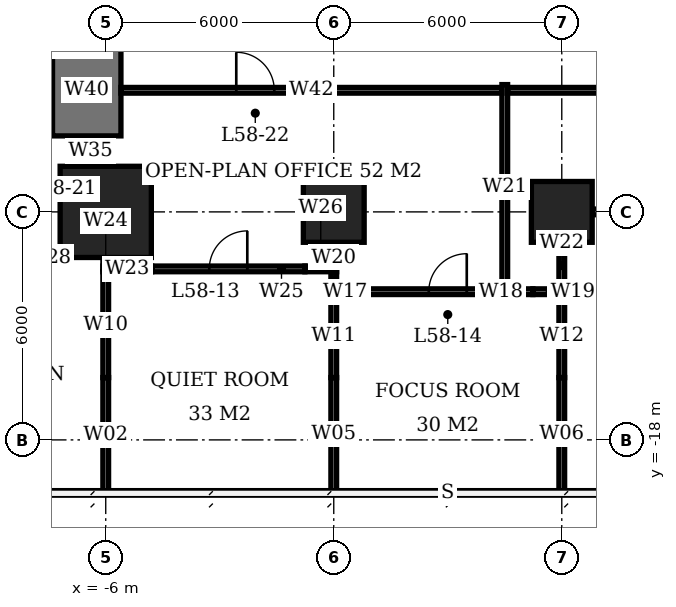
"""IFC4 building model, lengths in metres.
Left out: names, types, materials, properties, quantities, classifications, styles, units other than length and angle.
Written with IfcOpenShell. Run it as: python <this file> out.ifc"""

import sys

from ifc_helpers import new_model, si_unit, direction, frame, frame_2d, origin, origin_2d, place, context, subcontext, project, spatial, rectangle, extrude, element, fill, save


model = new_model("IFC4")
c1 = context("Model", 3, precision=1e-05, world=origin(), true_north=direction((0.0, 1.0)))
c2 = subcontext(c1, "Body", "Model", "MODEL_VIEW")
j1 = project(units=[si_unit("LENGTHUNIT", "METRE"), si_unit("PLANEANGLEUNIT", "RADIAN")], contexts=[c1])
p1 = place(None, origin())
s1 = spatial("IfcSite", under=j1, at=p1, CompositionType="ELEMENT")
p2 = place(p1, origin())
s2 = spatial("IfcBuilding", under=s1, at=p2, CompositionType="ELEMENT")
p3 = place(p2, frame((0.0, 0.0, 235.7)))
s3 = spatial("IfcBuildingStorey", under=s2, at=p3, CompositionType="ELEMENT", Elevation=235.7)
p4 = place(p3, frame((-6.0, -12.0, 0.0), z_axis=(0.0, 0.0, 1.0), x_axis=(1.0, 0.0, 0.0)))
e1 = element("IfcColumn", 1, at=p4, inside=s3, PredefinedType="COLUMN", context=c2, shape_type="SweptSolid", body=[
    extrude(rectangle(XDim=2.4, YDim=2.4, at=origin_2d()), origin(), (0.0, 0.0, 1.0), 3.9),
])
for number, where, z_axis, x_axis in (
    (2, (0.0, -12.0, 0.0), (0.0, 0.0, 1.0), (1.0, 0.0, 0.0)),
    (3, (6.0, -12.0, 0.0), (0.0, 0.0, 1.0), (1.0, 0.0, 0.0)),
):
    element("IfcColumn", number, at=place(p3, frame(where, z_axis=z_axis, x_axis=x_axis)), inside=s3, PredefinedType="COLUMN", context=c2, shape_type="SweptSolid", body=[
        extrude(rectangle(XDim=1.6, YDim=1.6, at=origin_2d()), origin(), (0.0, 0.0, 1.0), 3.9),
    ])
p5 = place(p3, frame((-6.5, -10.0, 0.0), z_axis=(0.0, 0.0, 1.0), x_axis=(0.0, 1.0, 0.0)))
e4 = element("IfcWall", 4, at=p5, inside=s3, PredefinedType="SHEAR", context=c2, shape_type="SweptSolid", body=[
    extrude(rectangle(XDim=2.4, YDim=1.8, at=frame_2d((1.2, 0.0))), origin(), (0.0, 0.0, 1.0), 3.9),
])
p6 = place(p3, frame((-0.15, -14.1, 0.0), z_axis=(0.0, 0.0, 1.0), x_axis=(1.0, 0.0, 0.0)))
e5 = element("IfcWall", 5, at=p6, inside=s3, PredefinedType="PARTITIONING", context=c2, shape_type="SweptSolid", body=[
    extrude(rectangle(XDim=0.91, YDim=0.15, at=frame_2d((0.455, 0.0))), origin(), (0.0, 0.0, 1.0), 2.15),
])
p7 = place(p3, frame((0.76, -14.1, 0.0), z_axis=(0.0, 0.0, 1.0), x_axis=(1.0, 0.0, 0.0)))
e6 = element("IfcWall", 6, at=p7, inside=s3, PredefinedType="PARTITIONING", context=c2, shape_type="SweptSolid", body=[
    extrude(rectangle(XDim=4.48, YDim=0.15, at=frame_2d((2.24, 0.0))), origin(), (0.0, 0.0, 1.0), 3.65),
])
p8 = place(p7, frame((1.74, 0.0, 0.0)))
e7 = element("IfcOpeningElement", 7, at=p8, cuts=e6, PredefinedType="OPENING", context=c2, shape_type="SweptSolid", body=[
    extrude(rectangle(XDim=1.0, YDim=2.1, at=frame_2d((0.5, 1.05))), frame((0.0, 0.085, 0.0), z_axis=(0.0, -1.0, 0.0), x_axis=(1.0, 0.0, 0.0)), (0.0, 0.0, 1.0), 0.17),
])
p9 = place(p3, frame((5.24, -14.1, 0.0), z_axis=(0.0, 0.0, 1.0), x_axis=(1.0, 0.0, 0.0)))
e8 = element("IfcWall", 8, at=p9, inside=s3, PredefinedType="PARTITIONING", context=c2, shape_type="SweptSolid", body=[
    extrude(rectangle(XDim=0.91, YDim=0.15, at=frame_2d((0.455, 0.0))), origin(), (0.0, 0.0, 1.0), 2.15),
])
p10 = place(p3, frame((-6.075, -13.5, 0.0), z_axis=(0.0, 0.0, 1.0), x_axis=(1.0, 0.0, 0.0)))
e9 = element("IfcWall", 9, at=p10, inside=s3, PredefinedType="PARTITIONING", context=c2, shape_type="SweptSolid", body=[
    extrude(rectangle(XDim=1.285, YDim=0.15, at=frame_2d((0.643, 0.0))), origin(), (0.0, 0.0, 1.0), 2.15),
])
p11 = place(p3, frame((-4.79, -13.5, 0.0), z_axis=(0.0, 0.0, 1.0), x_axis=(1.0, 0.0, 0.0)))
e10 = element("IfcWall", 10, at=p11, inside=s3, PredefinedType="PARTITIONING", context=c2, shape_type="SweptSolid", body=[
    extrude(rectangle(XDim=4.03, YDim=0.15, at=frame_2d((2.015, 0.0))), origin(), (0.0, 0.0, 1.0), 3.65),
])
p12 = place(p11, frame((1.515, 0.0, 0.0)))
e11 = element("IfcOpeningElement", 11, at=p12, cuts=e10, PredefinedType="OPENING", context=c2, shape_type="SweptSolid", body=[
    extrude(rectangle(XDim=1.0, YDim=2.1, at=frame_2d((0.5, 1.05))), frame((0.0, 0.085, 0.0), z_axis=(0.0, -1.0, 0.0), x_axis=(1.0, 0.0, 0.0)), (0.0, 0.0, 1.0), 0.17),
])
p13 = place(p3, frame((-0.76, -13.5, 0.0), z_axis=(0.0, 0.0, 1.0), x_axis=(1.0, 0.0, 0.0)))
e12 = element("IfcWall", 12, at=p13, inside=s3, PredefinedType="PARTITIONING", context=c2, shape_type="SweptSolid", body=[
    extrude(rectangle(XDim=0.835, YDim=0.15, at=frame_2d((0.417, 0.0))), origin(), (0.0, 0.0, 1.0), 2.15),
])
p14 = place(p3, frame((-8.992, -13.2, 0.0), z_axis=(0.0, 0.0, 1.0), x_axis=(1.0, 0.0, 0.0)))
e13 = element("IfcWall", 13, at=p14, inside=s3, PredefinedType="PARTITIONING", context=c2, shape_type="SweptSolid", body=[
    extrude(rectangle(XDim=1.792, YDim=0.15, at=frame_2d((0.896, 0.0))), origin(), (0.0, 0.0, 1.0), 2.15),
])
p15 = place(p3, frame((6.8, -12.0, 0.0), z_axis=(0.0, 0.0, 1.0), x_axis=(1.0, 0.0, 0.0)))
e14 = element("IfcWall", 14, at=p15, inside=s3, PredefinedType="PARTITIONING", context=c2, shape_type="SweptSolid", body=[
    extrude(rectangle(XDim=4.4, YDim=0.15, at=frame_2d((2.2, 0.0))), origin(), (0.0, 0.0, 1.0), 3.65),
])
p16 = place(p15, frame((1.7, 0.0, 0.0)))
e15 = element("IfcOpeningElement", 15, at=p16, cuts=e14, PredefinedType="OPENING", context=c2, shape_type="SweptSolid", body=[
    extrude(rectangle(XDim=1.0, YDim=2.1, at=frame_2d((0.5, 1.05))), frame((0.0, 0.085, 0.0), z_axis=(0.0, -1.0, 0.0), x_axis=(1.0, 0.0, 0.0)), (0.0, 0.0, 1.0), 0.17),
])
p17 = place(p3, frame((-6.0, -19.4, 0.0), z_axis=(0.0, 0.0, 1.0), x_axis=(0.0, 1.0, 0.0)))
e16 = element("IfcWall", 16, at=p17, inside=s3, PredefinedType="PARTITIONING", context=c2, shape_type="SweptSolid", body=[
    extrude(rectangle(XDim=3.04, YDim=0.15, at=frame_2d((1.52, 0.0))), origin(), (0.0, 0.0, 1.0), 3.65),
])
p18 = place(p3, frame((-6.0, -16.36, 0.0), z_axis=(0.0, 0.0, 1.0), x_axis=(0.0, 1.0, 0.0)))
e17 = element("IfcWall", 17, at=p18, inside=s3, PredefinedType="PARTITIONING", context=c2, shape_type="SweptSolid", body=[
    extrude(rectangle(XDim=2.785, YDim=0.15, at=frame_2d((1.393, 0.0))), origin(), (0.0, 0.0, 1.0), 2.15),
])
p19 = place(p3, frame((-6.0, -13.5, 0.0), z_axis=(0.0, 0.0, 1.0), x_axis=(0.0, 1.0, 0.0)))
e18 = element("IfcWall", 18, at=p19, inside=s3, PredefinedType="PARTITIONING", context=c2, shape_type="SweptSolid", body=[
    extrude(rectangle(XDim=0.3, YDim=0.15, at=frame_2d((0.15, 0.0))), origin(), (0.0, 0.0, 1.0), 2.15),
])
p20 = place(p3, frame((0.0, -19.35, 0.0), z_axis=(0.0, 0.0, 1.0), x_axis=(0.0, 1.0, 0.0)))
e19 = element("IfcWall", 19, at=p20, inside=s3, PredefinedType="PARTITIONING", context=c2, shape_type="SweptSolid", body=[
    extrude(rectangle(XDim=2.99, YDim=0.15, at=frame_2d((1.495, 0.0))), origin(), (0.0, 0.0, 1.0), 3.65),
])
p21 = place(p3, frame((0.0, -16.36, 0.0), z_axis=(0.0, 0.0, 1.0), x_axis=(0.0, 1.0, 0.0)))
e20 = element("IfcWall", 20, at=p21, inside=s3, PredefinedType="PARTITIONING", context=c2, shape_type="SweptSolid", body=[
    extrude(rectangle(XDim=2.185, YDim=0.15, at=frame_2d((1.093, 0.0))), origin(), (0.0, 0.0, 1.0), 2.15),
])
p22 = place(p3, frame((0.0, -14.025, 0.0), z_axis=(0.0, 0.0, 1.0), x_axis=(0.0, 1.0, 0.0)))
e21 = element("IfcWall", 21, at=p22, inside=s3, PredefinedType="PARTITIONING", context=c2, shape_type="SweptSolid", body=[
    extrude(rectangle(XDim=0.45, YDim=0.15, at=frame_2d((0.225, 0.0))), origin(), (0.0, 0.0, 1.0), 2.15),
])
p23 = place(p3, frame((6.0, -19.35, 0.0), z_axis=(0.0, 0.0, 1.0), x_axis=(0.0, 1.0, 0.0)))
e22 = element("IfcWall", 22, at=p23, inside=s3, PredefinedType="PARTITIONING", context=c2, shape_type="SweptSolid", body=[
    extrude(rectangle(XDim=2.99, YDim=0.15, at=frame_2d((1.495, 0.0))), origin(), (0.0, 0.0, 1.0), 3.65),
])
p24 = place(p3, frame((6.0, -16.36, 0.0), z_axis=(0.0, 0.0, 1.0), x_axis=(0.0, 1.0, 0.0)))
e23 = element("IfcWall", 23, at=p24, inside=s3, PredefinedType="PARTITIONING", context=c2, shape_type="SweptSolid", body=[
    extrude(rectangle(XDim=2.185, YDim=0.15, at=frame_2d((1.093, 0.0))), origin(), (0.0, 0.0, 1.0), 2.15),
])
p25 = place(p3, frame((6.0, -14.025, 0.0), z_axis=(0.0, 0.0, 1.0), x_axis=(0.0, 1.0, 0.0)))
e24 = element("IfcWall", 24, at=p25, inside=s3, PredefinedType="PARTITIONING", context=c2, shape_type="SweptSolid", body=[
    extrude(rectangle(XDim=1.225, YDim=0.15, at=frame_2d((0.612, 0.0))), origin(), (0.0, 0.0, 1.0), 2.15),
])
p26 = place(p3, frame((-6.4, -10.8, 0.0), z_axis=(0.0, 0.0, 1.0), x_axis=(0.0, 1.0, 0.0)))
e25 = element("IfcWall", 25, at=p26, inside=s3, PredefinedType="PARTITIONING", context=c2, shape_type="SweptSolid", body=[
    extrude(rectangle(XDim=0.8, YDim=0.15, at=frame_2d((0.4, 0.0))), origin(), (0.0, 0.0, 1.0), 3.65),
])
p27 = place(p3, frame((-5.6, -8.8, 0.0), z_axis=(0.0, 0.0, 1.0), x_axis=(1.0, 0.0, 0.0)))
e26 = element("IfcWall", 26, at=p27, inside=s3, PredefinedType="PARTITIONING", context=c2, shape_type="SweptSolid", body=[
    extrude(rectangle(XDim=10.025, YDim=0.15, at=frame_2d((5.013, 0.0))), origin(), (0.0, 0.0, 1.0), 3.65),
])
p28 = place(p27, frame((3.035, 0.0, 0.0)))
e27 = element("IfcOpeningElement", 27, at=p28, cuts=e26, PredefinedType="OPENING", context=c2, shape_type="SweptSolid", body=[
    extrude(rectangle(XDim=1.0, YDim=2.1, at=frame_2d((0.5, 1.05))), frame((0.0, 0.085, 0.0), z_axis=(0.0, -1.0, 0.0), x_axis=(1.0, 0.0, 0.0)), (0.0, 0.0, 1.0), 0.17),
])
p29 = place(p3, frame((4.5, -14.025, 0.0), z_axis=(0.0, 0.0, 1.0), x_axis=(0.0, 1.0, 0.0)))
e28 = element("IfcWall", 28, at=p29, inside=s3, PredefinedType="PARTITIONING", context=c2, shape_type="SweptSolid", body=[
    extrude(rectangle(XDim=5.375, YDim=0.15, at=frame_2d((2.688, 0.0))), origin(), (0.0, 0.0, 1.0), 3.65),
])
p30 = place(p3, frame((4.575, -8.8, 0.0), z_axis=(0.0, 0.0, 1.0), x_axis=(1.0, 0.0, 0.0)))
e29 = element("IfcWall", 29, at=p30, inside=s3, PredefinedType="PARTITIONING", context=c2, shape_type="SweptSolid", body=[
    extrude(rectangle(XDim=13.025, YDim=0.15, at=frame_2d((6.513, 0.0))), origin(), (0.0, 0.0, 1.0), 3.65),
])
p31 = place(p30, frame((4.01, 0.0, 0.0)))
e30 = element("IfcOpeningElement", 30, at=p31, cuts=e29, PredefinedType="OPENING", context=c2, shape_type="SweptSolid", body=[
    extrude(rectangle(XDim=1.0, YDim=2.1, at=frame_2d((0.5, 1.05))), frame((0.0, 0.085, 0.0), z_axis=(0.0, -1.0, 0.0), x_axis=(1.0, 0.0, 0.0)), (0.0, 0.0, 1.0), 0.17),
])
p32 = place(p12, origin())
e31 = element("IfcDoor", 31, at=p32, inside=s3, OperationType="SINGLE_SWING_RIGHT", PredefinedType="DOOR", context=c2, shape_type="SweptSolid", body=[
    extrude(rectangle(XDim=1.0, YDim=2.1, at=frame_2d((0.5, 1.05))), frame((0.0, 0.025, 0.0), z_axis=(0.0, -1.0, 0.0), x_axis=(1.0, 0.0, 0.0)), (0.0, 0.0, 1.0), 0.05),
])
fill(e11, e31)
p33 = place(p8, origin())
e32 = element("IfcDoor", 32, at=p33, inside=s3, OperationType="SINGLE_SWING_RIGHT", PredefinedType="DOOR", context=c2, shape_type="SweptSolid", body=[
    extrude(rectangle(XDim=1.0, YDim=2.1, at=frame_2d((0.5, 1.05))), frame((0.0, 0.025, 0.0), z_axis=(0.0, -1.0, 0.0), x_axis=(1.0, 0.0, 0.0)), (0.0, 0.0, 1.0), 0.05),
])
fill(e7, e32)
p34 = place(p28, origin())
e33 = element("IfcDoor", 33, at=p34, inside=s3, OperationType="SINGLE_SWING_LEFT", PredefinedType="DOOR", context=c2, shape_type="SweptSolid", body=[
    extrude(rectangle(XDim=1.0, YDim=2.1, at=frame_2d((0.5, 1.05))), frame((0.0, 0.025, 0.0), z_axis=(0.0, -1.0, 0.0), x_axis=(1.0, 0.0, 0.0)), (0.0, 0.0, 1.0), 0.05),
])
fill(e27, e33)
save(model, sys.argv[1])
